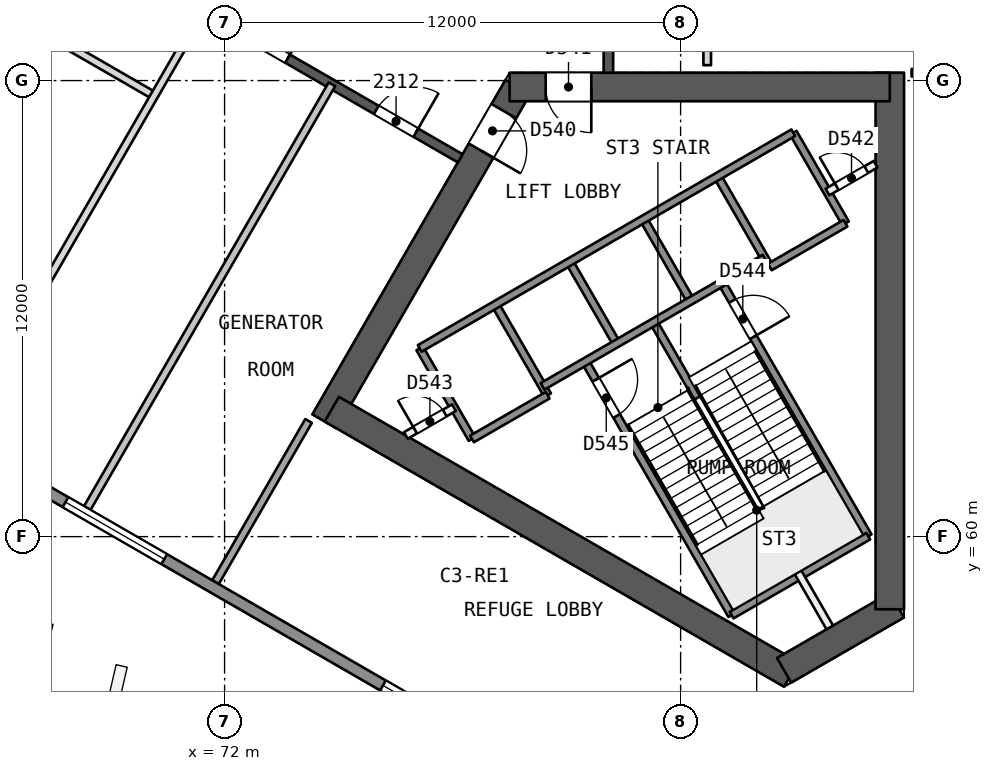
"""IFC4 building model, lengths in metres.
Left out: names, types, materials, properties, quantities, classifications, styles, units other than length and angle.
Written with IfcOpenShell. Run it as: python <this file> out.ifc"""

import sys

from ifc_helpers import new_model, si_unit, direction, frame, frame_2d, origin, place, context, subcontext, project, spatial, rectangle, extrude, element, fill, save


model = new_model("IFC4")
c1 = context("Model", 3, precision=1e-05, world=origin(), true_north=direction((0.0, 1.0)))
c2 = subcontext(c1, "Body", "Model", "MODEL_VIEW")
j1 = project(units=[si_unit("LENGTHUNIT", "METRE"), si_unit("PLANEANGLEUNIT", "RADIAN")], contexts=[c1])
p1 = place(None, origin())
s1 = spatial("IfcSite", under=j1, at=p1, CompositionType="ELEMENT")
p2 = place(p1, origin())
s2 = spatial("IfcBuilding", under=s1, at=p2, CompositionType="ELEMENT")
p3 = place(p2, frame((0.0, 0.0, 98.0)))
s3 = spatial("IfcBuildingStorey", under=s2, at=p3, CompositionType="ELEMENT", Elevation=98.0)
p4 = place(p3, frame((79.717, 71.831, 0.0), z_axis=(0.0, 0.0, 1.0), x_axis=(-0.499996230114, -0.866027580318, 0.0)))
e1 = element("IfcWall", 1, at=p4, inside=s3, PredefinedType="SHEAR", context=c2, shape_type="SweptSolid", body=[
    extrude(rectangle(XDim=10.164, YDim=0.75, at=frame_2d((5.082, 0.0))), origin(), (0.0, 0.0, 1.0), 4.4),
])
p5 = place(p4, frame((0.733, 0.0, 0.0)))
e2 = element("IfcOpeningElement", 2, at=p5, cuts=e1, PredefinedType="OPENING", context=c2, shape_type="SweptSolid", body=[
    extrude(rectangle(XDim=1.2, YDim=2.1, at=frame_2d((0.6, 1.05))), frame((0.0, 0.385, 0.0), z_axis=(0.0, -1.0, 0.0), x_axis=(1.0, 0.0, 0.0)), (0.0, 0.0, 1.0), 0.771),
])
p6 = place(p3, frame((74.822, 63.354, 0.0), z_axis=(0.0, 0.0, 1.0), x_axis=(0.8660248072, -0.500001033313, 0.0)))
e3 = element("IfcWall", 3, at=p6, inside=s3, PredefinedType="SHEAR", context=c2, shape_type="SweptSolid", body=[
    extrude(rectangle(XDim=13.958, YDim=0.75, at=frame_2d((6.979, 0.0))), origin(), (0.0, 0.0, 1.0), 4.4),
])
p7 = place(p3, frame((86.723, 56.483, 0.0), z_axis=(0.0, 0.0, 1.0), x_axis=(0.866017201164, 0.500014207086, 0.0)))
e4 = element("IfcWall", 4, at=p7, inside=s3, PredefinedType="SHEAR", context=c2, shape_type="SweptSolid", body=[
    extrude(rectangle(XDim=3.429, YDim=0.75, at=frame_2d((1.714, 0.0))), origin(), (0.0, 0.0, 1.0), 4.4),
])
p8 = place(p3, frame((89.505, 58.089, 0.0), z_axis=(0.0, 0.0, 1.0), x_axis=(0.0, 1.0, 0.0)))
e5 = element("IfcWall", 5, at=p8, inside=s3, PredefinedType="SHEAR", context=c2, shape_type="SweptSolid", body=[
    extrude(rectangle(XDim=14.117, YDim=0.75, at=frame_2d((7.059, 0.0))), origin(), (0.0, 0.0, 1.0), 4.4),
])
p9 = place(p3, frame((89.505, 71.831, 0.0), z_axis=(0.0, 0.0, 1.0), x_axis=(-1.0, 0.0, 0.0)))
e6 = element("IfcWall", 6, at=p9, inside=s3, PredefinedType="SHEAR", context=c2, shape_type="SweptSolid", body=[
    extrude(rectangle(XDim=10.005, YDim=0.75, at=frame_2d((5.002, 0.0))), origin(), (0.0, 0.0, 1.0), 4.4),
])
p10 = place(p9, frame((7.855, 0.0, 0.0)))
e7 = element("IfcOpeningElement", 7, at=p10, cuts=e6, PredefinedType="OPENING", context=c2, shape_type="SweptSolid", body=[
    extrude(rectangle(XDim=1.2, YDim=2.1, at=frame_2d((0.6, 1.05))), frame((0.0, 0.385, 0.0), z_axis=(0.0, -1.0, 0.0), x_axis=(1.0, 0.0, 0.0)), (0.0, 0.0, 1.0), 0.771),
])
p11 = place(p3, frame((82.1, 72.206, 0.0), z_axis=(0.0, 0.0, 1.0), x_axis=(0.0, 1.0, 0.0)))
e8 = element("IfcWall", 8, at=p11, inside=s3, PredefinedType="SHEAR", context=c2, shape_type="SweptSolid", body=[
    extrude(rectangle(XDim=15.588, YDim=0.25, at=frame_2d((7.794, 0.0))), origin(), (0.0, 0.0, 1.0), 3.9),
])
p12 = place(p11, frame((3.297, 0.0, 0.0)))
e9 = element("IfcOpeningElement", 9, at=p12, cuts=e8, PredefinedType="OPENING", context=c2, shape_type="SweptSolid", body=[
    extrude(rectangle(XDim=1.2, YDim=2.4, at=frame_2d((0.6, 1.2))), frame((0.0, 0.135, 0.0), z_axis=(0.0, -1.0, 0.0), x_axis=(1.0, 0.0, 0.0)), (0.0, 0.0, 1.0), 0.271),
])
p13 = place(p11, frame((9.143, 0.0, 0.0)))
e10 = element("IfcOpeningElement", 10, at=p13, cuts=e8, PredefinedType="OPENING", context=c2, shape_type="SweptSolid", body=[
    extrude(rectangle(XDim=1.2, YDim=2.4, at=frame_2d((0.6, 1.2))), frame((0.0, 0.135, 0.0), z_axis=(0.0, -1.0, 0.0), x_axis=(1.0, 0.0, 0.0)), (0.0, 0.0, 1.0), 0.271),
])
p14 = place(p11, frame((13.04, 0.0, 0.0)))
e11 = element("IfcOpeningElement", 11, at=p14, cuts=e8, PredefinedType="OPENING", context=c2, shape_type="SweptSolid", body=[
    extrude(rectangle(XDim=1.2, YDim=2.4, at=frame_2d((0.6, 1.2))), frame((0.0, 0.135, 0.0), z_axis=(0.0, -1.0, 0.0), x_axis=(1.0, 0.0, 0.0)), (0.0, 0.0, 1.0), 0.271),
])
p15 = place(p3, frame((64.7, 77.748, 0.0), z_axis=(0.0, 0.0, 1.0), x_axis=(0.866026492143, -0.499998114903, 0.0)))
e12 = element("IfcWall", 12, at=p15, inside=s3, PredefinedType="SHEAR", context=c2, shape_type="SweptSolid", body=[
    extrude(rectangle(XDim=15.588, YDim=0.25, at=frame_2d((7.794, 0.0))), origin(), (0.0, 0.0, 1.0), 3.9),
])
p16 = place(p15, frame((3.297, 0.0, 0.0)))
e13 = element("IfcOpeningElement", 13, at=p16, cuts=e12, PredefinedType="OPENING", context=c2, shape_type="SweptSolid", body=[
    extrude(rectangle(XDim=1.2, YDim=2.4, at=frame_2d((0.6, 1.2))), frame((0.0, 0.135, 0.0), z_axis=(0.0, -1.0, 0.0), x_axis=(1.0, 0.0, 0.0)), (0.0, 0.0, 1.0), 0.271),
])
p17 = place(p15, frame((9.143, 0.0, 0.0)))
e14 = element("IfcOpeningElement", 14, at=p17, cuts=e12, PredefinedType="OPENING", context=c2, shape_type="SweptSolid", body=[
    extrude(rectangle(XDim=1.2, YDim=2.4, at=frame_2d((0.6, 1.2))), frame((0.0, 0.135, 0.0), z_axis=(0.0, -1.0, 0.0), x_axis=(1.0, 0.0, 0.0)), (0.0, 0.0, 1.0), 0.271),
])
p18 = place(p15, frame((13.04, 0.0, 0.0)))
e15 = element("IfcOpeningElement", 15, at=p18, cuts=e12, PredefinedType="OPENING", context=c2, shape_type="SweptSolid", body=[
    extrude(rectangle(XDim=1.2, YDim=2.4, at=frame_2d((0.6, 1.2))), frame((0.0, 0.135, 0.0), z_axis=(0.0, -1.0, 0.0), x_axis=(1.0, 0.0, 0.0)), (0.0, 0.0, 1.0), 0.271),
])
p19 = place(p3, frame((84.7, 72.405, 0.0), z_axis=(0.0, 0.0, 1.0), x_axis=(0.0, 1.0, 0.0)))
e16 = element("IfcWall", 16, at=p19, inside=s3, PredefinedType="PARTITIONING", context=c2, shape_type="SweptSolid", body=[
    extrude(rectangle(XDim=7.595, YDim=0.2, at=frame_2d((3.798, 0.0))), origin(), (0.0, 0.0, 1.0), 3.9),
])
p20 = place(p19, frame((3.198, 0.0, 0.0)))
e17 = element("IfcOpeningElement", 17, at=p20, cuts=e16, PredefinedType="OPENING", context=c2, shape_type="SweptSolid", body=[
    extrude(rectangle(XDim=1.2, YDim=2.4, at=frame_2d((0.6, 1.2))), frame((0.0, 0.11, 0.0), z_axis=(0.0, -1.0, 0.0), x_axis=(1.0, 0.0, 0.0)), (0.0, 0.0, 1.0), 0.221),
])
p21 = place(p3, frame((94.978, 72.206, 0.0), z_axis=(0.0, 0.0, 1.0), x_axis=(-1.0, 0.0, 0.0)))
e18 = element("IfcWall", 18, at=p21, inside=s3, PredefinedType="PARTITIONING", context=c2, shape_type="SweptSolid", body=[
    extrude(rectangle(XDim=4.899, YDim=0.2, at=frame_2d((2.45, 0.0))), origin(), (0.0, 0.0, 1.0), 3.9),
])
p22 = place(p21, frame((1.85, 0.0, 0.0)))
e19 = element("IfcOpeningElement", 19, at=p22, cuts=e18, PredefinedType="OPENING", context=c2, shape_type="SweptSolid", body=[
    extrude(rectangle(XDim=1.2, YDim=2.4, at=frame_2d((0.6, 1.2))), frame((0.0, 0.11, 0.0), z_axis=(0.0, -1.0, 0.0), x_axis=(1.0, 0.0, 0.0)), (0.0, 0.0, 1.0), 0.221),
])
p23 = place(p3, frame((63.572, 75.397, 0.0), z_axis=(0.0, 0.0, 1.0), x_axis=(0.866024999478, -0.500000700278, 0.0)))
e20 = element("IfcWall", 20, at=p23, inside=s3, PredefinedType="PARTITIONING", context=c2, shape_type="SweptSolid", body=[
    extrude(rectangle(XDim=7.595, YDim=0.2, at=frame_2d((3.798, 0.0))), origin(), (0.0, 0.0, 1.0), 3.9),
])
p24 = place(p23, frame((3.198, 0.0, 0.0)))
e21 = element("IfcOpeningElement", 21, at=p24, cuts=e20, PredefinedType="OPENING", context=c2, shape_type="SweptSolid", body=[
    extrude(rectangle(XDim=1.2, YDim=2.4, at=frame_2d((0.6, 1.2))), frame((0.0, 0.11, 0.0), z_axis=(0.0, -1.0, 0.0), x_axis=(1.0, 0.0, 0.0)), (0.0, 0.0, 1.0), 0.221),
])
for number, where, z_axis, x_axis in (
    (22, (65.011, 62.698, 0.0), (0.0, 0.0, 1.0), (0.5, 0.866, 0.0)),
    (23, (68.386, 60.75, 0.0), (0.0, 0.0, 1.0), (0.5, 0.866, 0.0)),
):
    element("IfcWall", number, at=place(p3, frame(where, z_axis=z_axis, x_axis=x_axis)), inside=s3, PredefinedType="PARTITIONING", context=c2, shape_type="SweptSolid", body=[
        extrude(rectangle(XDim=12.878, YDim=0.2, at=frame_2d((6.439, 0.0))), origin(), (0.0, 0.0, 1.0), 3.9),
    ])
p25 = place(p3, frame((74.21, 63.044, 0.0), z_axis=(0.0, 0.0, 1.0), x_axis=(-0.499971209087, -0.866042025588, 0.0)))
e24 = element("IfcWall", 24, at=p25, inside=s3, PredefinedType="PARTITIONING", context=c2, shape_type="SweptSolid", body=[
    extrude(rectangle(XDim=4.899, YDim=0.2, at=frame_2d((2.45, 0.0))), origin(), (0.0, 0.0, 1.0), 3.9),
])
p26 = place(p3, frame((89.998, 48.1, 0.0), z_axis=(0.0, 0.0, 1.0), x_axis=(-0.866025498246, 0.499999836387, 0.0)))
e25 = element("IfcWall", 25, at=p26, inside=s3, PredefinedType="SOLIDWALL", context=c2, shape_type="SweptSolid", body=[
    extrude(rectangle(XDim=57.878, YDim=0.3, at=frame_2d((28.939, 0.0))), origin(), (0.0, 0.0, 1.0), 3.9),
])
p27 = place(p26, frame((3.323, 0.0, 0.6)))
e26 = element("IfcOpeningElement", 26, at=p27, cuts=e25, PredefinedType="OPENING", context=c2, shape_type="SweptSolid", body=[
    extrude(rectangle(XDim=3.0, YDim=2.4, at=frame_2d((1.5, 1.2))), frame((0.0, 0.161, 0.0), z_axis=(0.0, -1.0, 0.0), x_axis=(1.0, 0.0, 0.0)), (0.0, 0.0, 1.0), 0.321),
])
p28 = place(p26, frame((12.969, 0.0, 0.6)))
e27 = element("IfcOpeningElement", 27, at=p28, cuts=e25, PredefinedType="OPENING", context=c2, shape_type="SweptSolid", body=[
    extrude(rectangle(XDim=3.0, YDim=2.4, at=frame_2d((1.5, 1.2))), frame((0.0, 0.161, 0.0), z_axis=(0.0, -1.0, 0.0), x_axis=(1.0, 0.0, 0.0)), (0.0, 0.0, 1.0), 0.321),
])
p29 = place(p26, frame((22.616, 0.0, 0.6)))
e28 = element("IfcOpeningElement", 28, at=p29, cuts=e25, PredefinedType="OPENING", context=c2, shape_type="SweptSolid", body=[
    extrude(rectangle(XDim=3.0, YDim=2.4, at=frame_2d((1.5, 1.2))), frame((0.0, 0.161, 0.0), z_axis=(0.0, -1.0, 0.0), x_axis=(1.0, 0.0, 0.0)), (0.0, 0.0, 1.0), 0.321),
])
p30 = place(p26, frame((32.262, 0.0, 0.6)))
e29 = element("IfcOpeningElement", 29, at=p30, cuts=e25, PredefinedType="OPENING", context=c2, shape_type="SweptSolid", body=[
    extrude(rectangle(XDim=3.0, YDim=2.4, at=frame_2d((1.5, 1.2))), frame((0.0, 0.161, 0.0), z_axis=(0.0, -1.0, 0.0), x_axis=(1.0, 0.0, 0.0)), (0.0, 0.0, 1.0), 0.321),
])
p31 = place(p26, frame((41.908, 0.0, 0.6)))
e30 = element("IfcOpeningElement", 30, at=p31, cuts=e25, PredefinedType="OPENING", context=c2, shape_type="SweptSolid", body=[
    extrude(rectangle(XDim=3.0, YDim=2.4, at=frame_2d((1.5, 1.2))), frame((0.0, 0.161, 0.0), z_axis=(0.0, -1.0, 0.0), x_axis=(1.0, 0.0, 0.0)), (0.0, 0.0, 1.0), 0.321),
])
p32 = place(p26, frame((51.555, 0.0, 0.6)))
e31 = element("IfcOpeningElement", 31, at=p32, cuts=e25, PredefinedType="OPENING", context=c2, shape_type="SweptSolid", body=[
    extrude(rectangle(XDim=3.0, YDim=2.4, at=frame_2d((1.5, 1.2))), frame((0.0, 0.161, 0.0), z_axis=(0.0, -1.0, 0.0), x_axis=(1.0, 0.0, 0.0)), (0.0, 0.0, 1.0), 0.321),
])
for number, where, z_axis, x_axis in (
    (32, (77.135, 64.952, 0.0), (0.0, 0.0, 1.0), (0.5, -0.866, 0.0)),
    (33, (79.127, 66.102, 0.0), (0.0, 0.0, 1.0), (0.5, -0.866, 0.0)),
):
    element("IfcWall", number, at=place(p3, frame(where, z_axis=z_axis, x_axis=x_axis)), inside=s3, PredefinedType="SOLIDWALL", context=c2, shape_type="SweptSolid", body=[
        extrude(rectangle(XDim=2.75, YDim=0.2, at=frame_2d((1.375, 0.0))), origin(), (0.0, 0.0, 1.0), 3.9),
    ])
p33 = place(p3, frame((81.493, 64.604, 0.0), z_axis=(0.0, 0.0, 1.0), x_axis=(0.500006057782, -0.866021906294, 0.0)))
e34 = element("IfcWall", 34, at=p33, inside=s3, PredefinedType="SOLIDWALL", context=c2, shape_type="SweptSolid", body=[
    extrude(rectangle(XDim=7.7, YDim=0.2, at=frame_2d((3.85, 0.0))), origin(), (0.0, 0.0, 1.0), 3.9),
])
p34 = place(p33, frame((0.55, 0.0, 0.0)))
e35 = element("IfcOpeningElement", 35, at=p34, cuts=e34, PredefinedType="OPENING", context=c2, shape_type="SweptSolid", body=[
    extrude(rectangle(XDim=1.1, YDim=2.1, at=frame_2d((0.55, 1.05))), frame((0.0, 0.11, 0.0), z_axis=(0.0, -1.0, 0.0), x_axis=(1.0, 0.0, 0.0)), (0.0, 0.0, 1.0), 0.221),
])
p35 = place(p3, frame((81.076, 67.227, 0.0), z_axis=(0.0, 0.0, 1.0), x_axis=(0.50000366821, -0.866023285932, 0.0)))
e36 = element("IfcWall", 36, at=p35, inside=s3, PredefinedType="SOLIDWALL", context=c2, shape_type="SweptSolid", body=[
    extrude(rectangle(XDim=2.48, YDim=0.2, at=frame_2d((1.24, 0.0))), origin(), (0.0, 0.0, 1.0), 3.9),
])
p36 = place(p3, frame((83.34, 65.555, 0.0), z_axis=(0.0, 0.0, 1.0), x_axis=(0.499946605688, -0.86605622881, 0.0)))
e37 = element("IfcWall", 37, at=p36, inside=s3, PredefinedType="SOLIDWALL", context=c2, shape_type="SweptSolid", body=[
    extrude(rectangle(XDim=2.2, YDim=0.2, at=frame_2d((1.1, 0.0))), origin(), (0.0, 0.0, 1.0), 3.9),
])
p37 = place(p3, frame((87.09, 59.06, 0.0), z_axis=(0.0, 0.0, 1.0), x_axis=(0.499937194881, -0.866061661301, 0.0)))
e38 = element("IfcWall", 38, at=p37, inside=s3, PredefinedType="PARTITIONING", context=c2, shape_type="SweptSolid", body=[
    extrude(rectangle(XDim=1.673, YDim=0.2, at=frame_2d((0.836, 0.0))), origin(), (0.0, 0.0, 1.0), 3.9),
])
p38 = place(p3, frame((83.024, 68.352, 0.0), z_axis=(0.0, 0.0, 1.0), x_axis=(0.50000366821, -0.866023285932, 0.0)))
e39 = element("IfcWall", 39, at=p38, inside=s3, PredefinedType="SOLIDWALL", context=c2, shape_type="SweptSolid", body=[
    extrude(rectangle(XDim=2.48, YDim=0.2, at=frame_2d((1.24, 0.0))), origin(), (0.0, 0.0, 1.0), 3.9),
])
p39 = place(p3, frame((85.087, 66.679, 0.0), z_axis=(0.0, 0.0, 1.0), x_axis=(0.500019787375, -0.866013979237, 0.0)))
e40 = element("IfcWall", 40, at=p39, inside=s3, PredefinedType="SOLIDWALL", context=c2, shape_type="SweptSolid", body=[
    extrude(rectangle(XDim=7.7, YDim=0.2, at=frame_2d((3.85, 0.0))), origin(), (0.0, 0.0, 1.0), 3.9),
])
p40 = place(p39, frame((0.55, 0.0, 0.0)))
e41 = element("IfcOpeningElement", 41, at=p40, cuts=e40, PredefinedType="OPENING", context=c2, shape_type="SweptSolid", body=[
    extrude(rectangle(XDim=1.1, YDim=2.1, at=frame_2d((0.55, 1.05))), frame((0.0, 0.11, 0.0), z_axis=(0.0, -1.0, 0.0), x_axis=(1.0, 0.0, 0.0)), (0.0, 0.0, 1.0), 0.221),
])
for number, where, z_axis, x_axis in (
    (42, (84.973, 69.477, 0.0), (0.0, 0.0, 1.0), (0.5, -0.866, 0.0)),
    (43, (86.965, 70.626, 0.0), (0.0, 0.0, 1.0), (0.5, -0.866, 0.0)),
):
    element("IfcWall", number, at=place(p3, frame(where, z_axis=z_axis, x_axis=x_axis)), inside=s3, PredefinedType="SOLIDWALL", context=c2, shape_type="SweptSolid", body=[
        extrude(rectangle(XDim=2.75, YDim=0.2, at=frame_2d((1.375, 0.0))), origin(), (0.0, 0.0, 1.0), 3.9),
    ])
p41 = place(p3, frame((77.135, 64.952, 0.0), z_axis=(0.0, 0.0, 1.0), x_axis=(0.866031916153, 0.499988720078, 0.0)))
e44 = element("IfcWall", 44, at=p41, inside=s3, PredefinedType="SOLIDWALL", context=c2, shape_type="SweptSolid", body=[
    extrude(rectangle(XDim=11.35, YDim=0.2, at=frame_2d((5.675, 0.0))), origin(), (0.0, 0.0, 1.0), 3.9),
])
p42 = place(p3, frame((76.77, 62.662, 0.0), z_axis=(0.0, 0.0, 1.0), x_axis=(0.866054810376, 0.49994906283, 0.0)))
e45 = element("IfcWall", 45, at=p42, inside=s3, PredefinedType="PARTITIONING", context=c2, shape_type="SweptSolid", body=[
    extrude(rectangle(XDim=1.461, YDim=0.2, at=frame_2d((0.73, 0.0))), origin(), (0.0, 0.0, 1.0), 3.9),
])
p43 = place(p42, frame((0.281, 0.0, 0.0)))
e46 = element("IfcOpeningElement", 46, at=p43, cuts=e45, PredefinedType="OPENING", context=c2, shape_type="SweptSolid", body=[
    extrude(rectangle(XDim=0.9, YDim=2.1, at=frame_2d((0.45, 1.05))), frame((0.0, 0.11, 0.0), z_axis=(0.0, -1.0, 0.0), x_axis=(1.0, 0.0, 0.0)), (0.0, 0.0, 1.0), 0.221),
])
p44 = place(p3, frame((87.865, 69.068, 0.0), z_axis=(0.0, 0.0, 1.0), x_axis=(0.865982457891, 0.500074377092, 0.0)))
e47 = element("IfcWall", 47, at=p44, inside=s3, PredefinedType="PARTITIONING", context=c2, shape_type="SweptSolid", body=[
    extrude(rectangle(XDim=1.461, YDim=0.2, at=frame_2d((0.73, 0.0))), origin(), (0.0, 0.0, 1.0), 3.9),
])
p45 = place(p44, frame((0.281, 0.0, 0.0)))
e48 = element("IfcOpeningElement", 48, at=p45, cuts=e47, PredefinedType="OPENING", context=c2, shape_type="SweptSolid", body=[
    extrude(rectangle(XDim=0.9, YDim=2.1, at=frame_2d((0.45, 1.05))), frame((0.0, 0.11, 0.0), z_axis=(0.0, -1.0, 0.0), x_axis=(1.0, 0.0, 0.0)), (0.0, 0.0, 1.0), 0.221),
])
p46 = place(p3, frame((80.367, 63.954, 0.0), z_axis=(0.0, 0.0, 1.0), x_axis=(0.866026575979, 0.499997969693, 0.0)))
e49 = element("IfcWall", 49, at=p46, inside=s3, PredefinedType="SOLIDWALL", context=c2, shape_type="SweptSolid", body=[
    extrude(rectangle(XDim=6.75, YDim=0.2, at=frame_2d((3.375, 0.0))), origin(), (0.0, 0.0, 1.0), 3.9),
])
p47 = place(p3, frame((78.51, 62.57, 0.0), z_axis=(0.0, 0.0, 1.0), x_axis=(0.866053019151, 0.499952165731, 0.0)))
e50 = element("IfcWall", 50, at=p47, inside=s3, PredefinedType="SOLIDWALL", context=c2, shape_type="SweptSolid", body=[
    extrude(rectangle(XDim=2.3, YDim=0.2, at=frame_2d((1.15, 0.0))), origin(), (0.0, 0.0, 1.0), 3.9),
])
p48 = place(p3, frame((86.348, 67.095, 0.0), z_axis=(0.0, 0.0, 1.0), x_axis=(0.86602648383, 0.499998129301, 0.0)))
e51 = element("IfcWall", 51, at=p48, inside=s3, PredefinedType="SOLIDWALL", context=c2, shape_type="SweptSolid", body=[
    extrude(rectangle(XDim=2.3, YDim=0.2, at=frame_2d((1.15, 0.0))), origin(), (0.0, 0.0, 1.0), 3.9),
])
p49 = place(p3, frame((85.343, 57.935, 0.0), z_axis=(0.0, 0.0, 1.0), x_axis=(0.866004344652, 0.500036473714, 0.0)))
e52 = element("IfcWall", 52, at=p49, inside=s3, PredefinedType="SOLIDWALL", context=c2, shape_type="SweptSolid", body=[
    extrude(rectangle(XDim=4.15, YDim=0.2, at=frame_2d((2.075, 0.0))), origin(), (0.0, 0.0, 1.0), 3.9),
])
p50 = place(p17, origin())
e53 = element("IfcDoor", 53, at=p50, inside=s3, OperationType="SINGLE_SWING_RIGHT", PredefinedType="NOTDEFINED", context=c2, shape_type="SweptSolid", body=[
    extrude(rectangle(XDim=1.2, YDim=2.4, at=frame_2d((0.6, 1.2))), frame((0.0, 0.025, 0.0), z_axis=(0.0, -1.0, 0.0), x_axis=(1.0, 0.0, 0.0)), (0.0, 0.0, 1.0), 0.05),
])
fill(e14, e53)
p51 = place(p18, origin())
e54 = element("IfcDoor", 54, at=p51, inside=s3, OperationType="SINGLE_SWING_RIGHT", PredefinedType="NOTDEFINED", context=c2, shape_type="SweptSolid", body=[
    extrude(rectangle(XDim=1.2, YDim=2.4, at=frame_2d((0.6, 1.2))), frame((0.0, 0.025, 0.0), z_axis=(0.0, -1.0, 0.0), x_axis=(1.0, 0.0, 0.0)), (0.0, 0.0, 1.0), 0.05),
])
fill(e15, e54)
p52 = place(p28, origin())
e55 = element("IfcWindow", 55, at=p52, inside=s3, PartitioningType="SINGLE_PANEL", PredefinedType="WINDOW", context=c2, shape_type="SweptSolid", body=[
    extrude(rectangle(XDim=3.0, YDim=2.4, at=frame_2d((1.5, 1.2))), frame((0.0, 0.03, 0.0), z_axis=(0.0, -1.0, 0.0), x_axis=(1.0, 0.0, 0.0)), (0.0, 0.0, 1.0), 0.06),
])
fill(e27, e55)
p53 = place(p29, origin())
e56 = element("IfcWindow", 56, at=p53, inside=s3, PartitioningType="SINGLE_PANEL", PredefinedType="WINDOW", context=c2, shape_type="SweptSolid", body=[
    extrude(rectangle(XDim=3.0, YDim=2.4, at=frame_2d((1.5, 1.2))), frame((0.0, 0.03, 0.0), z_axis=(0.0, -1.0, 0.0), x_axis=(1.0, 0.0, 0.0)), (0.0, 0.0, 1.0), 0.06),
])
fill(e28, e56)
p54 = place(p5, origin())
e57 = element("IfcDoor", 57, at=p54, inside=s3, OperationType="SINGLE_SWING_RIGHT", PredefinedType="NOTDEFINED", context=c2, shape_type="SweptSolid", body=[
    extrude(rectangle(XDim=1.2, YDim=2.1, at=frame_2d((0.6, 1.05))), frame((0.0, 0.025, 0.0), z_axis=(0.0, -1.0, 0.0), x_axis=(1.0, 0.0, 0.0)), (0.0, 0.0, 1.0), 0.05),
])
fill(e2, e57)
p55 = place(p10, origin())
e58 = element("IfcDoor", 58, at=p55, inside=s3, OperationType="SINGLE_SWING_LEFT", PredefinedType="NOTDEFINED", context=c2, shape_type="SweptSolid", body=[
    extrude(rectangle(XDim=1.2, YDim=2.1, at=frame_2d((0.6, 1.05))), frame((0.0, 0.025, 0.0), z_axis=(0.0, -1.0, 0.0), x_axis=(1.0, 0.0, 0.0)), (0.0, 0.0, 1.0), 0.05),
])
fill(e7, e58)
p56 = place(p45, origin())
e59 = element("IfcDoor", 59, at=p56, inside=s3, OperationType="SINGLE_SWING_LEFT", PredefinedType="NOTDEFINED", context=c2, shape_type="SweptSolid", body=[
    extrude(rectangle(XDim=0.9, YDim=2.1, at=frame_2d((0.45, 1.05))), frame((0.0, 0.025, 0.0), z_axis=(0.0, -1.0, 0.0), x_axis=(1.0, 0.0, 0.0)), (0.0, 0.0, 1.0), 0.05),
])
fill(e48, e59)
p57 = place(p43, origin())
e60 = element("IfcDoor", 60, at=p57, inside=s3, OperationType="SINGLE_SWING_LEFT", PredefinedType="NOTDEFINED", context=c2, shape_type="SweptSolid", body=[
    extrude(rectangle(XDim=0.9, YDim=2.1, at=frame_2d((0.45, 1.05))), frame((0.0, 0.025, 0.0), z_axis=(0.0, -1.0, 0.0), x_axis=(1.0, 0.0, 0.0)), (0.0, 0.0, 1.0), 0.05),
])
fill(e46, e60)
p58 = place(p40, origin())
e61 = element("IfcDoor", 61, at=p58, inside=s3, OperationType="SINGLE_SWING_RIGHT", PredefinedType="NOTDEFINED", context=c2, shape_type="SweptSolid", body=[
    extrude(rectangle(XDim=1.1, YDim=2.1, at=frame_2d((0.55, 1.05))), frame((0.0, 0.025, 0.0), z_axis=(0.0, -1.0, 0.0), x_axis=(1.0, 0.0, 0.0)), (0.0, 0.0, 1.0), 0.05),
])
fill(e41, e61)
p59 = place(p34, origin())
e62 = element("IfcDoor", 62, at=p59, inside=s3, OperationType="SINGLE_SWING_LEFT", PredefinedType="NOTDEFINED", context=c2, shape_type="SweptSolid", body=[
    extrude(rectangle(XDim=1.1, YDim=2.1, at=frame_2d((0.55, 1.05))), frame((0.0, 0.025, 0.0), z_axis=(0.0, -1.0, 0.0), x_axis=(1.0, 0.0, 0.0)), (0.0, 0.0, 1.0), 0.05),
])
fill(e35, e62)
save(model, sys.argv[1])
